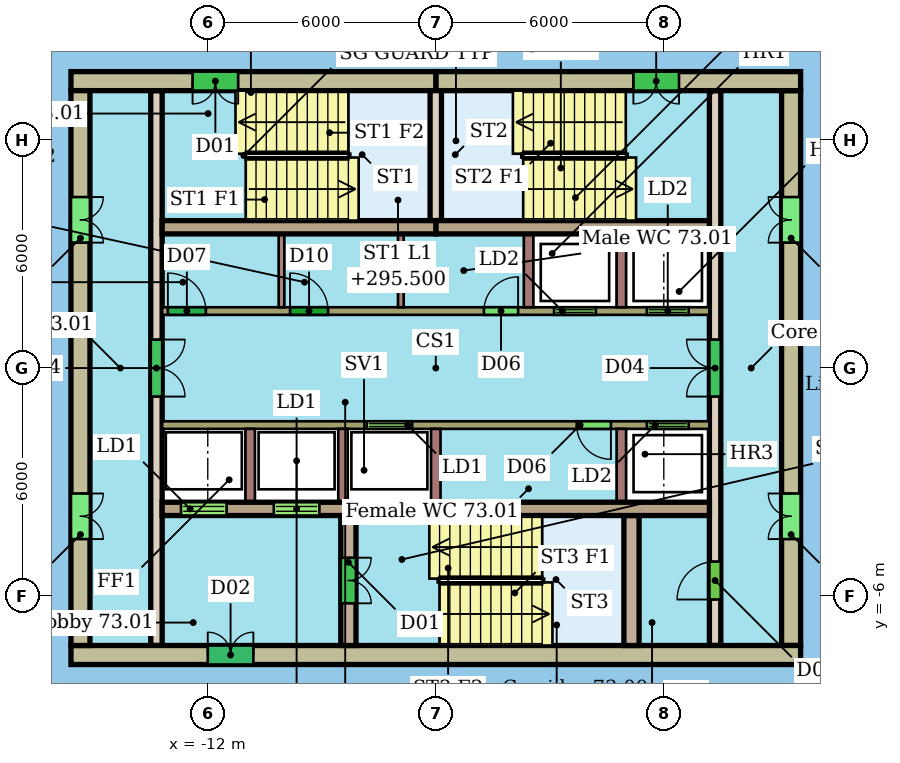
"""IFC4 building model, lengths in metres.
Left out: names, types, materials, properties, quantities, classifications, styles, units other than length and angle.
Written with IfcOpenShell. Run it as: python <this file> out.ifc"""

import sys

from ifc_helpers import new_model, si_unit, direction, frame, frame_2d, origin, place, context, subcontext, project, spatial, rectangle, extrude, element, fill, save


model = new_model("IFC4")
c1 = context("Model", 3, precision=1e-05, world=origin(), true_north=direction((0.0, 1.0)))
c2 = subcontext(c1, "Body", "Model", "MODEL_VIEW")
j1 = project(units=[si_unit("LENGTHUNIT", "METRE"), si_unit("PLANEANGLEUNIT", "RADIAN")], contexts=[c1])
p1 = place(None, origin())
s1 = spatial("IfcSite", under=j1, at=p1, CompositionType="ELEMENT")
p2 = place(p1, origin())
s2 = spatial("IfcBuilding", under=s1, at=p2, CompositionType="ELEMENT")
p3 = place(p2, frame((0.0, 0.0, 293.7)))
s3 = spatial("IfcBuildingStorey", under=s2, at=p3, CompositionType="ELEMENT", Elevation=293.7)
p4 = place(p3, frame((3.6, 7.55, 0.0), z_axis=(0.0, 0.0, 1.0), x_axis=(-1.0, 0.0, 0.0)))
e1 = element("IfcWall", 1, at=p4, inside=s3, PredefinedType="SHEAR", context=c2, shape_type="SweptSolid", body=[
    extrude(rectangle(XDim=9.6, YDim=0.5, at=frame_2d((4.8, 0.0))), origin(), (0.0, 0.0, 1.0), 3.3),
])
p5 = place(p4, frame((3.2, 0.0, 0.0)))
e2 = element("IfcOpeningElement", 2, at=p5, cuts=e1, PredefinedType="OPENING", context=c2, shape_type="SweptSolid", body=[
    extrude(rectangle(XDim=1.2, YDim=2.1, at=frame_2d((0.6, 1.05))), frame((0.0, 0.26, 0.0), z_axis=(0.0, -1.0, 0.0), x_axis=(1.0, 0.0, 0.0)), (0.0, 0.0, 1.0), 0.52),
])
p6 = place(p3, frame((-6.0, 7.55, 0.0), z_axis=(0.0, 0.0, 1.0), x_axis=(-1.0, 0.0, 0.0)))
e3 = element("IfcWall", 3, at=p6, inside=s3, PredefinedType="SHEAR", context=c2, shape_type="SweptSolid", body=[
    extrude(rectangle(XDim=9.6, YDim=0.5, at=frame_2d((4.8, 0.0))), origin(), (0.0, 0.0, 1.0), 3.3),
])
p7 = place(p6, frame((5.2, 0.0, 0.0)))
e4 = element("IfcOpeningElement", 4, at=p7, cuts=e3, PredefinedType="OPENING", context=c2, shape_type="SweptSolid", body=[
    extrude(rectangle(XDim=1.2, YDim=2.1, at=frame_2d((0.6, 1.05))), frame((0.0, 0.26, 0.0), z_axis=(0.0, -1.0, 0.0), x_axis=(1.0, 0.0, 0.0)), (0.0, 0.0, 1.0), 0.52),
])
p8 = place(p3, frame((-15.6, -7.55, 0.0), z_axis=(0.0, 0.0, 1.0), x_axis=(1.0, 0.0, 0.0)))
e5 = element("IfcWall", 5, at=p8, inside=s3, PredefinedType="SHEAR", context=c2, shape_type="SweptSolid", body=[
    extrude(rectangle(XDim=19.2, YDim=0.5, at=frame_2d((9.6, 0.0))), origin(), (0.0, 0.0, 1.0), 3.3),
])
p9 = place(p8, frame((3.6, 0.0, 0.0)))
e6 = element("IfcOpeningElement", 6, at=p9, cuts=e5, PredefinedType="OPENING", context=c2, shape_type="SweptSolid", body=[
    extrude(rectangle(XDim=1.2, YDim=2.1, at=frame_2d((0.6, 1.05))), frame((0.0, 0.26, 0.0), z_axis=(0.0, -1.0, 0.0), x_axis=(1.0, 0.0, 0.0)), (0.0, 0.0, 1.0), 0.52),
])
p10 = place(p3, frame((-15.35, 7.3, 0.0), z_axis=(0.0, 0.0, 1.0), x_axis=(0.0, -1.0, 0.0)))
e7 = element("IfcWall", 7, at=p10, inside=s3, PredefinedType="SHEAR", context=c2, shape_type="SweptSolid", body=[
    extrude(rectangle(XDim=14.6, YDim=0.5, at=frame_2d((7.3, 0.0))), origin(), (0.0, 0.0, 1.0), 3.3),
])
p11 = place(p10, frame((10.6, 0.0, 0.0)))
e8 = element("IfcOpeningElement", 8, at=p11, cuts=e7, PredefinedType="OPENING", context=c2, shape_type="SweptSolid", body=[
    extrude(rectangle(XDim=1.2, YDim=2.1, at=frame_2d((0.6, 1.05))), frame((0.0, 0.26, 0.0), z_axis=(0.0, -1.0, 0.0), x_axis=(1.0, 0.0, 0.0)), (0.0, 0.0, 1.0), 0.52),
])
p12 = place(p10, frame((2.8, 0.0, 0.0)))
e9 = element("IfcOpeningElement", 9, at=p12, cuts=e7, PredefinedType="OPENING", context=c2, shape_type="SweptSolid", body=[
    extrude(rectangle(XDim=1.2, YDim=2.1, at=frame_2d((0.6, 1.05))), frame((0.0, 0.26, 0.0), z_axis=(0.0, -1.0, 0.0), x_axis=(1.0, 0.0, 0.0)), (0.0, 0.0, 1.0), 0.52),
])
p13 = place(p3, frame((3.35, -7.3, 0.0), z_axis=(0.0, 0.0, 1.0), x_axis=(0.0, 1.0, 0.0)))
e10 = element("IfcWall", 10, at=p13, inside=s3, PredefinedType="SHEAR", context=c2, shape_type="SweptSolid", body=[
    extrude(rectangle(XDim=14.6, YDim=0.5, at=frame_2d((7.3, 0.0))), origin(), (0.0, 0.0, 1.0), 3.3),
])
p14 = place(p13, frame((2.8, 0.0, 0.0)))
e11 = element("IfcOpeningElement", 11, at=p14, cuts=e10, PredefinedType="OPENING", context=c2, shape_type="SweptSolid", body=[
    extrude(rectangle(XDim=1.2, YDim=2.1, at=frame_2d((0.6, 1.05))), frame((0.0, 0.26, 0.0), z_axis=(0.0, -1.0, 0.0), x_axis=(1.0, 0.0, 0.0)), (0.0, 0.0, 1.0), 0.52),
])
p15 = place(p13, frame((10.6, 0.0, 0.0)))
e12 = element("IfcOpeningElement", 12, at=p15, cuts=e10, PredefinedType="OPENING", context=c2, shape_type="SweptSolid", body=[
    extrude(rectangle(XDim=1.2, YDim=2.1, at=frame_2d((0.6, 1.05))), frame((0.0, 0.26, 0.0), z_axis=(0.0, -1.0, 0.0), x_axis=(1.0, 0.0, 0.0)), (0.0, 0.0, 1.0), 0.52),
])
for number, where, z_axis, x_axis in (
    (13, (-13.2, 3.705, 0.0), (0.0, 0.0, 1.0), (1.0, 0.0, 0.0)),
    (14, (-6.0, 3.705, 0.0), (0.0, 0.0, 1.0), (1.0, 0.0, 0.0)),
):
    element("IfcWall", number, at=place(p3, frame(where, z_axis=z_axis, x_axis=x_axis)), inside=s3, PredefinedType="SHEAR", context=c2, shape_type="SweptSolid", body=[
        extrude(rectangle(XDim=7.2, YDim=0.35, at=frame_2d((3.6, 0.0))), origin(), (0.0, 0.0, 1.0), 3.3),
    ])
p16 = place(p3, frame((-13.2, -3.705, 0.0), z_axis=(0.0, 0.0, 1.0), x_axis=(1.0, 0.0, 0.0)))
e15 = element("IfcWall", 15, at=p16, inside=s3, PredefinedType="SHEAR", context=c2, shape_type="SweptSolid", body=[
    extrude(rectangle(XDim=7.2, YDim=0.35, at=frame_2d((3.6, 0.0))), origin(), (0.0, 0.0, 1.0), 3.3),
])
p17 = place(p16, frame((0.496, 0.0, 0.0)))
e16 = element("IfcOpeningElement", 16, at=p17, cuts=e15, PredefinedType="OPENING", context=c2, shape_type="SweptSolid", body=[
    extrude(rectangle(XDim=1.2, YDim=2.1, at=frame_2d((0.6, 1.05))), frame((0.0, 0.185, 0.0), z_axis=(0.0, -1.0, 0.0), x_axis=(1.0, 0.0, 0.0)), (0.0, 0.0, 1.0), 0.37),
])
p18 = place(p16, frame((2.938, 0.0, 0.0)))
e17 = element("IfcOpeningElement", 17, at=p18, cuts=e15, PredefinedType="OPENING", context=c2, shape_type="SweptSolid", body=[
    extrude(rectangle(XDim=1.2, YDim=2.1, at=frame_2d((0.6, 1.05))), frame((0.0, 0.185, 0.0), z_axis=(0.0, -1.0, 0.0), x_axis=(1.0, 0.0, 0.0)), (0.0, 0.0, 1.0), 0.37),
])
p19 = place(p3, frame((-6.0, -3.705, 0.0), z_axis=(0.0, 0.0, 1.0), x_axis=(1.0, 0.0, 0.0)))
e18 = element("IfcWall", 18, at=p19, inside=s3, PredefinedType="SHEAR", context=c2, shape_type="SweptSolid", body=[
    extrude(rectangle(XDim=7.2, YDim=0.35, at=frame_2d((3.6, 0.0))), origin(), (0.0, 0.0, 1.0), 3.3),
])
p20 = place(p3, frame((-13.35, 7.3, 0.0), z_axis=(0.0, 0.0, 1.0), x_axis=(0.0, -1.0, 0.0)))
e19 = element("IfcWall", 19, at=p20, inside=s3, PredefinedType="SHEAR", context=c2, shape_type="SweptSolid", body=[
    extrude(rectangle(XDim=14.6, YDim=0.3, at=frame_2d((7.3, 0.0))), origin(), (0.0, 0.0, 1.0), 3.3),
])
p21 = place(p20, frame((6.55, 0.0, 0.0)))
e20 = element("IfcOpeningElement", 20, at=p21, cuts=e19, PredefinedType="OPENING", context=c2, shape_type="SweptSolid", body=[
    extrude(rectangle(XDim=1.5, YDim=2.1, at=frame_2d((0.75, 1.05))), frame((0.0, 0.16, 0.0), z_axis=(0.0, -1.0, 0.0), x_axis=(1.0, 0.0, 0.0)), (0.0, 0.0, 1.0), 0.32),
])
p22 = place(p3, frame((1.35, -7.3, 0.0), z_axis=(0.0, 0.0, 1.0), x_axis=(0.0, 1.0, 0.0)))
e21 = element("IfcWall", 21, at=p22, inside=s3, PredefinedType="SHEAR", context=c2, shape_type="SweptSolid", body=[
    extrude(rectangle(XDim=14.6, YDim=0.3, at=frame_2d((7.3, 0.0))), origin(), (0.0, 0.0, 1.0), 3.3),
])
p23 = place(p22, frame((1.21, 0.0, 0.0)))
e22 = element("IfcOpeningElement", 22, at=p23, cuts=e21, PredefinedType="OPENING", context=c2, shape_type="SweptSolid", body=[
    extrude(rectangle(XDim=1.0, YDim=2.1, at=frame_2d((0.5, 1.05))), frame((0.0, 0.16, 0.0), z_axis=(0.0, -1.0, 0.0), x_axis=(1.0, 0.0, 0.0)), (0.0, 0.0, 1.0), 0.32),
])
p24 = place(p22, frame((6.55, 0.0, 0.0)))
e23 = element("IfcOpeningElement", 23, at=p24, cuts=e21, PredefinedType="OPENING", context=c2, shape_type="SweptSolid", body=[
    extrude(rectangle(XDim=1.5, YDim=2.1, at=frame_2d((0.75, 1.05))), frame((0.0, 0.16, 0.0), z_axis=(0.0, -1.0, 0.0), x_axis=(1.0, 0.0, 0.0)), (0.0, 0.0, 1.0), 0.32),
])
p25 = place(p3, frame((-13.2, 1.5, 0.0), z_axis=(0.0, 0.0, 1.0), x_axis=(1.0, 0.0, 0.0)))
e24 = element("IfcWall", 24, at=p25, inside=s3, PredefinedType="SHEAR", context=c2, shape_type="SweptSolid", body=[
    extrude(rectangle(XDim=14.4, YDim=0.2, at=frame_2d((7.2, 0.0))), origin(), (0.0, 0.0, 1.0), 3.3),
])
p26 = place(p25, frame((10.312, 0.0, 0.0)))
e25 = element("IfcOpeningElement", 25, at=p26, cuts=e24, PredefinedType="OPENING", context=c2, shape_type="SweptSolid", body=[
    extrude(rectangle(XDim=1.1, YDim=2.1, at=frame_2d((0.55, 1.05))), frame((0.0, 0.11, 0.0), z_axis=(0.0, -1.0, 0.0), x_axis=(1.0, 0.0, 0.0)), (0.0, 0.0, 1.0), 0.22),
])
p27 = place(p25, frame((12.754, 0.0, 0.0)))
e26 = element("IfcOpeningElement", 26, at=p27, cuts=e24, PredefinedType="OPENING", context=c2, shape_type="SweptSolid", body=[
    extrude(rectangle(XDim=1.1, YDim=2.1, at=frame_2d((0.55, 1.05))), frame((0.0, 0.11, 0.0), z_axis=(0.0, -1.0, 0.0), x_axis=(1.0, 0.0, 0.0)), (0.0, 0.0, 1.0), 0.22),
])
p28 = place(p25, frame((0.15, 0.0, 0.0)))
e27 = element("IfcOpeningElement", 27, at=p28, cuts=e24, PredefinedType="OPENING", context=c2, shape_type="SweptSolid", body=[
    extrude(rectangle(XDim=1.0, YDim=2.1, at=frame_2d((0.5, 1.05))), frame((0.0, 0.11, 0.0), z_axis=(0.0, -1.0, 0.0), x_axis=(1.0, 0.0, 0.0)), (0.0, 0.0, 1.0), 0.22),
])
p29 = place(p25, frame((3.365, 0.0, 0.0)))
e28 = element("IfcOpeningElement", 28, at=p29, cuts=e24, PredefinedType="OPENING", context=c2, shape_type="SweptSolid", body=[
    extrude(rectangle(XDim=1.0, YDim=2.1, at=frame_2d((0.5, 1.05))), frame((0.0, 0.11, 0.0), z_axis=(0.0, -1.0, 0.0), x_axis=(1.0, 0.0, 0.0)), (0.0, 0.0, 1.0), 0.22),
])
p30 = place(p25, frame((8.467, 0.0, 0.0)))
e29 = element("IfcOpeningElement", 29, at=p30, cuts=e24, PredefinedType="OPENING", context=c2, shape_type="SweptSolid", body=[
    extrude(rectangle(XDim=0.9, YDim=2.1, at=frame_2d((0.45, 1.05))), frame((0.0, 0.11, 0.0), z_axis=(0.0, -1.0, 0.0), x_axis=(1.0, 0.0, 0.0)), (0.0, 0.0, 1.0), 0.22),
])
p31 = place(p3, frame((1.2, -1.5, 0.0), z_axis=(0.0, 0.0, 1.0), x_axis=(-1.0, 0.0, 0.0)))
e30 = element("IfcWall", 30, at=p31, inside=s3, PredefinedType="SHEAR", context=c2, shape_type="SweptSolid", body=[
    extrude(rectangle(XDim=14.4, YDim=0.2, at=frame_2d((7.2, 0.0))), origin(), (0.0, 0.0, 1.0), 3.3),
])
p32 = place(p31, frame((7.821, 0.0, 0.0)))
e31 = element("IfcOpeningElement", 31, at=p32, cuts=e30, PredefinedType="OPENING", context=c2, shape_type="SweptSolid", body=[
    extrude(rectangle(XDim=1.2, YDim=2.1, at=frame_2d((0.6, 1.05))), frame((0.0, 0.11, 0.0), z_axis=(0.0, -1.0, 0.0), x_axis=(1.0, 0.0, 0.0)), (0.0, 0.0, 1.0), 0.22),
])
p33 = place(p31, frame((0.546, 0.0, 0.0)))
e32 = element("IfcOpeningElement", 32, at=p33, cuts=e30, PredefinedType="OPENING", context=c2, shape_type="SweptSolid", body=[
    extrude(rectangle(XDim=1.1, YDim=2.1, at=frame_2d((0.55, 1.05))), frame((0.0, 0.11, 0.0), z_axis=(0.0, -1.0, 0.0), x_axis=(1.0, 0.0, 0.0)), (0.0, 0.0, 1.0), 0.22),
])
p34 = place(p31, frame((2.592, 0.0, 0.0)))
e33 = element("IfcOpeningElement", 33, at=p34, cuts=e30, PredefinedType="OPENING", context=c2, shape_type="SweptSolid", body=[
    extrude(rectangle(XDim=0.9, YDim=2.1, at=frame_2d((0.45, 1.05))), frame((0.0, 0.11, 0.0), z_axis=(0.0, -1.0, 0.0), x_axis=(1.0, 0.0, 0.0)), (0.0, 0.0, 1.0), 0.22),
])
p35 = place(p3, frame((-8.3, -3.88, 0.0), z_axis=(0.0, 0.0, 1.0), x_axis=(0.0, -1.0, 0.0)))
e34 = element("IfcWall", 34, at=p35, inside=s3, PredefinedType="SHEAR", context=c2, shape_type="SweptSolid", body=[
    extrude(rectangle(XDim=3.42, YDim=0.4, at=frame_2d((1.71, 0.0))), origin(), (0.0, 0.0, 1.0), 3.3),
])
p36 = place(p35, frame((1.11, 0.0, 0.0)))
e35 = element("IfcOpeningElement", 35, at=p36, cuts=e34, PredefinedType="OPENING", context=c2, shape_type="SweptSolid", body=[
    extrude(rectangle(XDim=1.2, YDim=2.1, at=frame_2d((0.6, 1.05))), frame((0.0, 0.21, 0.0), z_axis=(0.0, -1.0, 0.0), x_axis=(1.0, 0.0, 0.0)), (0.0, 0.0, 1.0), 0.42),
])
p37 = place(p3, frame((-0.85, -3.88, 0.0), z_axis=(0.0, 0.0, 1.0), x_axis=(0.0, -1.0, 0.0)))
e36 = element("IfcWall", 36, at=p37, inside=s3, PredefinedType="SHEAR", context=c2, shape_type="SweptSolid", body=[
    extrude(rectangle(XDim=3.42, YDim=0.4, at=frame_2d((1.71, 0.0))), origin(), (0.0, 0.0, 1.0), 3.3),
])
p38 = place(p3, frame((-6.0, 3.88, 0.0), z_axis=(0.0, 0.0, 1.0), x_axis=(0.0, 1.0, 0.0)))
e37 = element("IfcWall", 37, at=p38, inside=s3, PredefinedType="SHEAR", context=c2, shape_type="SweptSolid", body=[
    extrude(rectangle(XDim=3.42, YDim=0.3, at=frame_2d((1.71, 0.0))), origin(), (0.0, 0.0, 1.0), 3.3),
])
for number, where, z_axis, x_axis in (
    (38, (-3.558, 1.6, 0.0), (0.0, 0.0, 1.0), (0.0, 1.0, 0.0)),
    (39, (-1.117, 1.6, 0.0), (0.0, 0.0, 1.0), (0.0, 1.0, 0.0)),
):
    element("IfcWall", number, at=place(p3, frame(where, z_axis=z_axis, x_axis=x_axis)), inside=s3, PredefinedType="SHEAR", context=c2, shape_type="SweptSolid", body=[
        extrude(rectangle(XDim=1.93, YDim=0.25, at=frame_2d((0.965, 0.0))), origin(), (0.0, 0.0, 1.0), 3.3),
    ])
for number, where, z_axis, x_axis in (
    (40, (-10.06, 1.6, 0.0), (0.0, 0.0, 1.0), (0.0, 1.0, 0.0)),
    (41, (-6.919, 1.6, 0.0), (0.0, 0.0, 1.0), (0.0, 1.0, 0.0)),
):
    element("IfcWall", number, at=place(p3, frame(where, z_axis=z_axis, x_axis=x_axis)), inside=s3, PredefinedType="PARTITIONING", context=c2, shape_type="SweptSolid", body=[
        extrude(rectangle(XDim=1.93, YDim=0.15, at=frame_2d((0.965, 0.0))), origin(), (0.0, 0.0, 1.0), 3.3),
    ])
for number, where, z_axis, x_axis in (
    (42, (-10.883, -1.6, 0.0), (0.0, 0.0, 1.0), (0.0, -1.0, 0.0)),
    (43, (-8.442, -1.6, 0.0), (0.0, 0.0, 1.0), (0.0, -1.0, 0.0)),
    (44, (-6.0, -1.6, 0.0), (0.0, 0.0, 1.0), (0.0, -1.0, 0.0)),
    (45, (-1.117, -1.6, 0.0), (0.0, 0.0, 1.0), (0.0, -1.0, 0.0)),
):
    element("IfcWall", number, at=place(p3, frame(where, z_axis=z_axis, x_axis=x_axis)), inside=s3, PredefinedType="SHEAR", context=c2, shape_type="SweptSolid", body=[
        extrude(rectangle(XDim=1.93, YDim=0.25, at=frame_2d((0.965, 0.0))), origin(), (0.0, 0.0, 1.0), 3.3),
    ])
p39 = place(p5, origin())
e46 = element("IfcDoor", 46, at=p39, inside=s3, OperationType="DOUBLE_DOOR_SINGLE_SWING", PredefinedType="NOTDEFINED", context=c2, shape_type="SweptSolid", body=[
    extrude(rectangle(XDim=1.2, YDim=2.1, at=frame_2d((0.6, 1.05))), frame((0.0, 0.025, 0.0), z_axis=(0.0, -1.0, 0.0), x_axis=(1.0, 0.0, 0.0)), (0.0, 0.0, 1.0), 0.05),
])
fill(e2, e46)
p40 = place(p7, origin())
e47 = element("IfcDoor", 47, at=p40, inside=s3, OperationType="DOUBLE_DOOR_SINGLE_SWING", PredefinedType="NOTDEFINED", context=c2, shape_type="SweptSolid", body=[
    extrude(rectangle(XDim=1.2, YDim=2.1, at=frame_2d((0.6, 1.05))), frame((0.0, 0.025, 0.0), z_axis=(0.0, -1.0, 0.0), x_axis=(1.0, 0.0, 0.0)), (0.0, 0.0, 1.0), 0.05),
])
fill(e4, e47)
p41 = place(p9, origin())
e48 = element("IfcDoor", 48, at=p41, inside=s3, OperationType="DOUBLE_DOOR_SINGLE_SWING", PredefinedType="NOTDEFINED", context=c2, shape_type="SweptSolid", body=[
    extrude(rectangle(XDim=1.2, YDim=2.1, at=frame_2d((0.6, 1.05))), frame((0.0, 0.025, 0.0), z_axis=(0.0, -1.0, 0.0), x_axis=(1.0, 0.0, 0.0)), (0.0, 0.0, 1.0), 0.05),
])
fill(e6, e48)
p42 = place(p11, origin())
e49 = element("IfcDoor", 49, at=p42, inside=s3, OperationType="DOUBLE_DOOR_SINGLE_SWING", PredefinedType="NOTDEFINED", context=c2, shape_type="SweptSolid", body=[
    extrude(rectangle(XDim=1.2, YDim=2.1, at=frame_2d((0.6, 1.05))), frame((0.0, 0.025, 0.0), z_axis=(0.0, -1.0, 0.0), x_axis=(1.0, 0.0, 0.0)), (0.0, 0.0, 1.0), 0.05),
])
fill(e8, e49)
p43 = place(p12, origin())
e50 = element("IfcDoor", 50, at=p43, inside=s3, OperationType="DOUBLE_DOOR_SINGLE_SWING", PredefinedType="NOTDEFINED", context=c2, shape_type="SweptSolid", body=[
    extrude(rectangle(XDim=1.2, YDim=2.1, at=frame_2d((0.6, 1.05))), frame((0.0, 0.025, 0.0), z_axis=(0.0, -1.0, 0.0), x_axis=(1.0, 0.0, 0.0)), (0.0, 0.0, 1.0), 0.05),
])
fill(e9, e50)
p44 = place(p14, origin())
e51 = element("IfcDoor", 51, at=p44, inside=s3, OperationType="DOUBLE_DOOR_SINGLE_SWING", PredefinedType="NOTDEFINED", context=c2, shape_type="SweptSolid", body=[
    extrude(rectangle(XDim=1.2, YDim=2.1, at=frame_2d((0.6, 1.05))), frame((0.0, 0.025, 0.0), z_axis=(0.0, -1.0, 0.0), x_axis=(1.0, 0.0, 0.0)), (0.0, 0.0, 1.0), 0.05),
])
fill(e11, e51)
p45 = place(p15, origin())
e52 = element("IfcDoor", 52, at=p45, inside=s3, OperationType="DOUBLE_DOOR_SINGLE_SWING", PredefinedType="NOTDEFINED", context=c2, shape_type="SweptSolid", body=[
    extrude(rectangle(XDim=1.2, YDim=2.1, at=frame_2d((0.6, 1.05))), frame((0.0, 0.025, 0.0), z_axis=(0.0, -1.0, 0.0), x_axis=(1.0, 0.0, 0.0)), (0.0, 0.0, 1.0), 0.05),
])
fill(e12, e52)
p46 = place(p17, origin())
e53 = element("IfcDoor", 53, at=p46, inside=s3, OperationType="DOUBLE_DOOR_SLIDING", PredefinedType="NOTDEFINED", context=c2, shape_type="SweptSolid", body=[
    extrude(rectangle(XDim=1.2, YDim=2.1, at=frame_2d((0.6, 1.05))), frame((0.0, 0.025, 0.0), z_axis=(0.0, -1.0, 0.0), x_axis=(1.0, 0.0, 0.0)), (0.0, 0.0, 1.0), 0.05),
])
fill(e16, e53)
p47 = place(p18, origin())
e54 = element("IfcDoor", 54, at=p47, inside=s3, OperationType="DOUBLE_DOOR_SLIDING", PredefinedType="NOTDEFINED", context=c2, shape_type="SweptSolid", body=[
    extrude(rectangle(XDim=1.2, YDim=2.1, at=frame_2d((0.6, 1.05))), frame((0.0, 0.025, 0.0), z_axis=(0.0, -1.0, 0.0), x_axis=(1.0, 0.0, 0.0)), (0.0, 0.0, 1.0), 0.05),
])
fill(e17, e54)
p48 = place(p21, origin())
e55 = element("IfcDoor", 55, at=p48, inside=s3, OperationType="DOUBLE_DOOR_SINGLE_SWING", PredefinedType="NOTDEFINED", context=c2, shape_type="SweptSolid", body=[
    extrude(rectangle(XDim=1.5, YDim=2.1, at=frame_2d((0.75, 1.05))), frame((0.0, 0.025, 0.0), z_axis=(0.0, -1.0, 0.0), x_axis=(1.0, 0.0, 0.0)), (0.0, 0.0, 1.0), 0.05),
])
fill(e20, e55)
p49 = place(p23, origin())
e56 = element("IfcDoor", 56, at=p49, inside=s3, OperationType="SINGLE_SWING_LEFT", PredefinedType="NOTDEFINED", context=c2, shape_type="SweptSolid", body=[
    extrude(rectangle(XDim=1.0, YDim=2.1, at=frame_2d((0.5, 1.05))), frame((0.0, 0.025, 0.0), z_axis=(0.0, -1.0, 0.0), x_axis=(1.0, 0.0, 0.0)), (0.0, 0.0, 1.0), 0.05),
])
fill(e22, e56)
p50 = place(p24, origin())
e57 = element("IfcDoor", 57, at=p50, inside=s3, OperationType="DOUBLE_DOOR_SINGLE_SWING", PredefinedType="NOTDEFINED", context=c2, shape_type="SweptSolid", body=[
    extrude(rectangle(XDim=1.5, YDim=2.1, at=frame_2d((0.75, 1.05))), frame((0.0, 0.025, 0.0), z_axis=(0.0, -1.0, 0.0), x_axis=(1.0, 0.0, 0.0)), (0.0, 0.0, 1.0), 0.05),
])
fill(e23, e57)
p51 = place(p26, origin())
e58 = element("IfcDoor", 58, at=p51, inside=s3, OperationType="DOUBLE_DOOR_SLIDING", PredefinedType="NOTDEFINED", context=c2, shape_type="SweptSolid", body=[
    extrude(rectangle(XDim=1.1, YDim=2.1, at=frame_2d((0.55, 1.05))), frame((0.0, 0.025, 0.0), z_axis=(0.0, -1.0, 0.0), x_axis=(1.0, 0.0, 0.0)), (0.0, 0.0, 1.0), 0.05),
])
fill(e25, e58)
p52 = place(p27, origin())
e59 = element("IfcDoor", 59, at=p52, inside=s3, OperationType="DOUBLE_DOOR_SLIDING", PredefinedType="NOTDEFINED", context=c2, shape_type="SweptSolid", body=[
    extrude(rectangle(XDim=1.1, YDim=2.1, at=frame_2d((0.55, 1.05))), frame((0.0, 0.025, 0.0), z_axis=(0.0, -1.0, 0.0), x_axis=(1.0, 0.0, 0.0)), (0.0, 0.0, 1.0), 0.05),
])
fill(e26, e59)
p53 = place(p28, origin())
e60 = element("IfcDoor", 60, at=p53, inside=s3, OperationType="SINGLE_SWING_LEFT", PredefinedType="NOTDEFINED", context=c2, shape_type="SweptSolid", body=[
    extrude(rectangle(XDim=1.0, YDim=2.1, at=frame_2d((0.5, 1.05))), frame((0.0, 0.025, 0.0), z_axis=(0.0, -1.0, 0.0), x_axis=(1.0, 0.0, 0.0)), (0.0, 0.0, 1.0), 0.05),
])
fill(e27, e60)
p54 = place(p29, origin())
e61 = element("IfcDoor", 61, at=p54, inside=s3, OperationType="SINGLE_SWING_LEFT", PredefinedType="NOTDEFINED", context=c2, shape_type="SweptSolid", body=[
    extrude(rectangle(XDim=1.0, YDim=2.1, at=frame_2d((0.5, 1.05))), frame((0.0, 0.025, 0.0), z_axis=(0.0, -1.0, 0.0), x_axis=(1.0, 0.0, 0.0)), (0.0, 0.0, 1.0), 0.05),
])
fill(e28, e61)
p55 = place(p30, origin())
e62 = element("IfcDoor", 62, at=p55, inside=s3, OperationType="SINGLE_SWING_RIGHT", PredefinedType="NOTDEFINED", context=c2, shape_type="SweptSolid", body=[
    extrude(rectangle(XDim=0.9, YDim=2.1, at=frame_2d((0.45, 1.05))), frame((0.0, 0.025, 0.0), z_axis=(0.0, -1.0, 0.0), x_axis=(1.0, 0.0, 0.0)), (0.0, 0.0, 1.0), 0.05),
])
fill(e29, e62)
p56 = place(p32, origin())
e63 = element("IfcDoor", 63, at=p56, inside=s3, OperationType="DOUBLE_DOOR_SLIDING", PredefinedType="NOTDEFINED", context=c2, shape_type="SweptSolid", body=[
    extrude(rectangle(XDim=1.2, YDim=2.1, at=frame_2d((0.6, 1.05))), frame((0.0, 0.025, 0.0), z_axis=(0.0, -1.0, 0.0), x_axis=(1.0, 0.0, 0.0)), (0.0, 0.0, 1.0), 0.05),
])
fill(e31, e63)
p57 = place(p33, origin())
e64 = element("IfcDoor", 64, at=p57, inside=s3, OperationType="DOUBLE_DOOR_SLIDING", PredefinedType="NOTDEFINED", context=c2, shape_type="SweptSolid", body=[
    extrude(rectangle(XDim=1.1, YDim=2.1, at=frame_2d((0.55, 1.05))), frame((0.0, 0.025, 0.0), z_axis=(0.0, -1.0, 0.0), x_axis=(1.0, 0.0, 0.0)), (0.0, 0.0, 1.0), 0.05),
])
fill(e32, e64)
p58 = place(p34, origin())
e65 = element("IfcDoor", 65, at=p58, inside=s3, OperationType="SINGLE_SWING_LEFT", PredefinedType="NOTDEFINED", context=c2, shape_type="SweptSolid", body=[
    extrude(rectangle(XDim=0.9, YDim=2.1, at=frame_2d((0.45, 1.05))), frame((0.0, 0.025, 0.0), z_axis=(0.0, -1.0, 0.0), x_axis=(1.0, 0.0, 0.0)), (0.0, 0.0, 1.0), 0.05),
])
fill(e33, e65)
p59 = place(p36, origin())
e66 = element("IfcDoor", 66, at=p59, inside=s3, OperationType="DOUBLE_DOOR_SINGLE_SWING", PredefinedType="NOTDEFINED", context=c2, shape_type="SweptSolid", body=[
    extrude(rectangle(XDim=1.2, YDim=2.1, at=frame_2d((0.6, 1.05))), frame((0.0, 0.025, 0.0), z_axis=(0.0, -1.0, 0.0), x_axis=(1.0, 0.0, 0.0)), (0.0, 0.0, 1.0), 0.05),
])
fill(e35, e66)
save(model, sys.argv[1])
